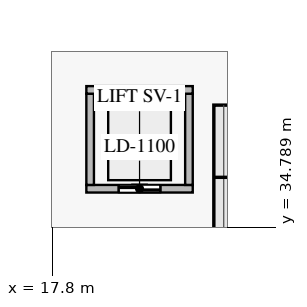
"""IFC4 building model, lengths in metres.
Left out: names, types, materials, properties, quantities, classifications, styles, units other than length and angle.
Written with IfcOpenShell. Run it as: python <this file> out.ifc"""

import sys

from ifc_helpers import new_model, si_unit, direction, frame, frame_2d, origin, place, context, subcontext, project, spatial, rectangle, extrude, source, transform, mapped, element, fill, save


model = new_model("IFC4")
c1 = context("Model", 3, precision=1e-05, world=origin(), true_north=direction((0.0, 1.0)))
c2 = subcontext(c1, "Body", "Model", "MODEL_VIEW")
j1 = project(units=[si_unit("LENGTHUNIT", "METRE"), si_unit("PLANEANGLEUNIT", "RADIAN")], contexts=[c1])
p1 = place(None, origin())
s1 = spatial("IfcSite", under=j1, at=p1, CompositionType="ELEMENT")
p2 = place(p1, origin())
s2 = spatial("IfcBuilding", under=s1, at=p2, CompositionType="ELEMENT")
p3 = place(p2, frame((0.0, 0.0, -10.8)))
s3 = spatial("IfcBuildingStorey", under=s2, at=p3, CompositionType="ELEMENT", Elevation=-10.8)
p4 = place(p3, frame((18.7, 35.8, 0.0), z_axis=(0.0, 0.0, 1.0), x_axis=(1.0, 0.0, 0.0)))
e1 = element("IfcWall", 1, at=p4, inside=s3, PredefinedType="STANDARD", context=c2, shape_type="SweptSolid", body=[
    extrude(rectangle(XDim=2.8, YDim=0.2, at=frame_2d((1.4, 0.0))), origin(), (0.0, 0.0, 1.0), 3.24),
])
p5 = place(p4, frame((0.85, 0.0, 0.0)))
e2 = element("IfcOpeningElement", 2, at=p5, cuts=e1, PredefinedType="OPENING", context=c2, shape_type="SweptSolid", body=[
    extrude(rectangle(XDim=1.1, YDim=2.2, at=frame_2d((0.55, 1.1))), frame((0.0, 0.11, 0.0), z_axis=(0.0, -1.0, 0.0), x_axis=(1.0, 0.0, 0.0)), (0.0, 0.0, 1.0), 0.22),
])
for number, where, z_axis, x_axis in (
    (3, (18.8, 35.9, 0.0), (0.0, 0.0, 1.0), (0.0, 1.0, 0.0)),
    (4, (21.4, 35.9, 0.0), (0.0, 0.0, 1.0), (0.0, 1.0, 0.0)),
):
    element("IfcWall", number, at=place(p3, frame(where, z_axis=z_axis, x_axis=x_axis)), inside=s3, PredefinedType="STANDARD", context=c2, shape_type="SweptSolid", body=[
        extrude(rectangle(XDim=2.4, YDim=0.2, at=frame_2d((1.2, 0.0))), origin(), (0.0, 0.0, 1.0), 3.24),
    ])
p6 = place(p3, frame((18.7, 38.4, 0.0), z_axis=(0.0, 0.0, 1.0), x_axis=(1.0, 0.0, 0.0)))
e5 = element("IfcWall", 5, at=p6, inside=s3, PredefinedType="STANDARD", context=c2, shape_type="SweptSolid", body=[
    extrude(rectangle(XDim=2.8, YDim=0.2, at=frame_2d((1.4, 0.0))), origin(), (0.0, 0.0, 1.0), 3.24),
])
m1 = source(origin(), c2, "Body", "SweptSolid", [
    extrude(rectangle(XDim=1.1, YDim=2.2, at=frame_2d((0.55, 1.1))), frame((0.0, 0.025, 0.0), z_axis=(0.0, -1.0, 0.0), x_axis=(1.0, 0.0, 0.0)), (0.0, 0.0, 1.0), 0.05),
])
p7 = place(p5, origin())
e6 = element("IfcDoor", 6, at=p7, inside=s3, OperationType="DOUBLE_DOOR_SLIDING", PredefinedType="DOOR", context=c2, shape_type="MappedRepresentation", body=[
    mapped(m1, transform((0.0, 0.0, 0.0), scale=1.0)),
])
fill(e2, e6)
save(model, sys.argv[1])
